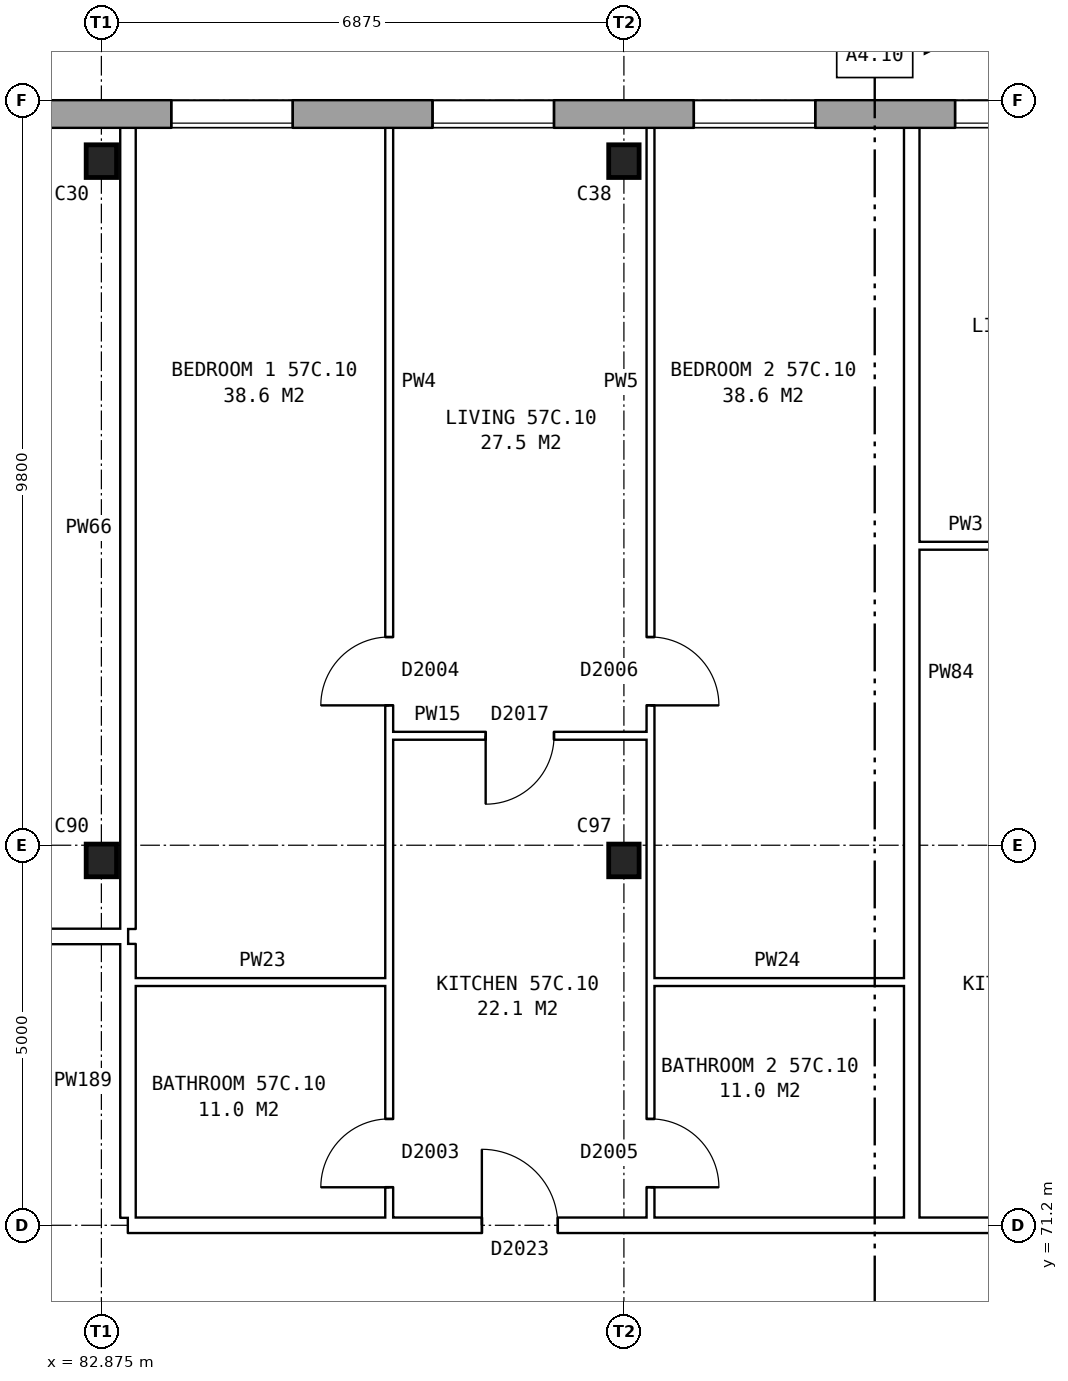
"""IFC4 building model, lengths in metres.
Left out: names, types, materials, properties, quantities, classifications, styles, units other than length and angle.
Written with IfcOpenShell. Run it as: python <this file> out.ifc"""

import sys

from ifc_helpers import new_model, si_unit, direction, frame, frame_2d, origin, origin_2d, place, context, subcontext, project, spatial, rectangle, i_section, extrude, element, fill, save


model = new_model("IFC4")
c1 = context("Model", 3, precision=1e-05, world=origin(), true_north=direction((0.0, 1.0)))
c2 = subcontext(c1, "Body", "Model", "MODEL_VIEW")
j1 = project(units=[si_unit("LENGTHUNIT", "METRE"), si_unit("PLANEANGLEUNIT", "RADIAN")], contexts=[c1])
p1 = place(None, origin())
s1 = spatial("IfcSite", under=j1, at=p1, CompositionType="ELEMENT")
p2 = place(p1, origin())
s2 = spatial("IfcBuilding", under=s1, at=p2, CompositionType="ELEMENT")
p3 = place(p2, frame((0.0, 0.0, 202.8)))
s3 = spatial("IfcBuildingStorey", under=s2, at=p3, CompositionType="ELEMENT", Elevation=202.8)
for number, where, z_axis, x_axis in (
    (1, (82.875, 76.0, 0.0), (0.0, 0.0, 1.0), (1.0, 0.0, 0.0)),
    (2, (89.75, 76.0, 0.0), (0.0, 0.0, 1.0), (1.0, 0.0, 0.0)),
    (3, (82.875, 85.2, 0.0), (0.0, 0.0, 1.0), (1.0, 0.0, 0.0)),
    (4, (89.75, 85.2, 0.0), (0.0, 0.0, 1.0), (1.0, 0.0, 0.0)),
):
    element("IfcColumn", number, at=place(p3, frame(where, z_axis=z_axis, x_axis=x_axis)), inside=s3, PredefinedType="COLUMN", context=c2, shape_type="SweptSolid", body=[
        extrude(i_section(OverallWidth=0.4, OverallDepth=0.43, WebThickness=0.04, FlangeThickness=0.04, at=origin_2d()), origin(), (0.0, 0.0, 1.0), 2.85),
    ])
p4 = place(p3, frame((131.05, 85.82, 0.0), z_axis=(0.0, 0.0, 1.0), x_axis=(-1.0, 0.0, 0.0)))
e5 = element("IfcWall", 5, at=p4, inside=s3, PredefinedType="STANDARD", context=c2, shape_type="SweptSolid", body=[
    extrude(rectangle(XDim=55.1, YDim=0.36, at=frame_2d((27.55, 0.0))), origin(), (0.0, 0.0, 1.0), 2.85),
])
p5 = place(p4, frame((0.969, 0.0, 0.8)))
e6 = element("IfcOpeningElement", 6, at=p5, cuts=e5, PredefinedType="OPENING", context=c2, shape_type="SweptSolid", body=[
    extrude(rectangle(XDim=1.6, YDim=1.8, at=frame_2d((0.8, 0.9))), frame((0.0, 0.19, 0.0), z_axis=(0.0, -1.0, 0.0), x_axis=(1.0, 0.0, 0.0)), (0.0, 0.0, 1.0), 0.38),
])
p6 = place(p4, frame((4.406, 0.0, 0.8)))
e7 = element("IfcOpeningElement", 7, at=p6, cuts=e5, PredefinedType="OPENING", context=c2, shape_type="SweptSolid", body=[
    extrude(rectangle(XDim=1.6, YDim=1.8, at=frame_2d((0.8, 0.9))), frame((0.0, 0.19, 0.0), z_axis=(0.0, -1.0, 0.0), x_axis=(1.0, 0.0, 0.0)), (0.0, 0.0, 1.0), 0.38),
])
p7 = place(p4, frame((7.844, 0.0, 0.8)))
e8 = element("IfcOpeningElement", 8, at=p7, cuts=e5, PredefinedType="OPENING", context=c2, shape_type="SweptSolid", body=[
    extrude(rectangle(XDim=1.6, YDim=1.8, at=frame_2d((0.8, 0.9))), frame((0.0, 0.19, 0.0), z_axis=(0.0, -1.0, 0.0), x_axis=(1.0, 0.0, 0.0)), (0.0, 0.0, 1.0), 0.38),
])
p8 = place(p4, frame((11.281, 0.0, 0.8)))
e9 = element("IfcOpeningElement", 9, at=p8, cuts=e5, PredefinedType="OPENING", context=c2, shape_type="SweptSolid", body=[
    extrude(rectangle(XDim=1.6, YDim=1.8, at=frame_2d((0.8, 0.9))), frame((0.0, 0.19, 0.0), z_axis=(0.0, -1.0, 0.0), x_axis=(1.0, 0.0, 0.0)), (0.0, 0.0, 1.0), 0.38),
])
p9 = place(p4, frame((14.719, 0.0, 0.8)))
e10 = element("IfcOpeningElement", 10, at=p9, cuts=e5, PredefinedType="OPENING", context=c2, shape_type="SweptSolid", body=[
    extrude(rectangle(XDim=1.6, YDim=1.8, at=frame_2d((0.8, 0.9))), frame((0.0, 0.19, 0.0), z_axis=(0.0, -1.0, 0.0), x_axis=(1.0, 0.0, 0.0)), (0.0, 0.0, 1.0), 0.38),
])
p10 = place(p4, frame((18.156, 0.0, 0.8)))
e11 = element("IfcOpeningElement", 11, at=p10, cuts=e5, PredefinedType="OPENING", context=c2, shape_type="SweptSolid", body=[
    extrude(rectangle(XDim=1.6, YDim=1.8, at=frame_2d((0.8, 0.9))), frame((0.0, 0.19, 0.0), z_axis=(0.0, -1.0, 0.0), x_axis=(1.0, 0.0, 0.0)), (0.0, 0.0, 1.0), 0.38),
])
p11 = place(p4, frame((21.594, 0.0, 0.8)))
e12 = element("IfcOpeningElement", 12, at=p11, cuts=e5, PredefinedType="OPENING", context=c2, shape_type="SweptSolid", body=[
    extrude(rectangle(XDim=1.6, YDim=1.8, at=frame_2d((0.8, 0.9))), frame((0.0, 0.19, 0.0), z_axis=(0.0, -1.0, 0.0), x_axis=(1.0, 0.0, 0.0)), (0.0, 0.0, 1.0), 0.38),
])
p12 = place(p4, frame((25.031, 0.0, 0.8)))
e13 = element("IfcOpeningElement", 13, at=p12, cuts=e5, PredefinedType="OPENING", context=c2, shape_type="SweptSolid", body=[
    extrude(rectangle(XDim=1.6, YDim=1.8, at=frame_2d((0.8, 0.9))), frame((0.0, 0.19, 0.0), z_axis=(0.0, -1.0, 0.0), x_axis=(1.0, 0.0, 0.0)), (0.0, 0.0, 1.0), 0.38),
])
p13 = place(p4, frame((28.469, 0.0, 0.8)))
e14 = element("IfcOpeningElement", 14, at=p13, cuts=e5, PredefinedType="OPENING", context=c2, shape_type="SweptSolid", body=[
    extrude(rectangle(XDim=1.6, YDim=1.8, at=frame_2d((0.8, 0.9))), frame((0.0, 0.19, 0.0), z_axis=(0.0, -1.0, 0.0), x_axis=(1.0, 0.0, 0.0)), (0.0, 0.0, 1.0), 0.38),
])
p14 = place(p4, frame((31.906, 0.0, 0.8)))
e15 = element("IfcOpeningElement", 15, at=p14, cuts=e5, PredefinedType="OPENING", context=c2, shape_type="SweptSolid", body=[
    extrude(rectangle(XDim=1.6, YDim=1.8, at=frame_2d((0.8, 0.9))), frame((0.0, 0.19, 0.0), z_axis=(0.0, -1.0, 0.0), x_axis=(1.0, 0.0, 0.0)), (0.0, 0.0, 1.0), 0.38),
])
p15 = place(p4, frame((35.344, 0.0, 0.8)))
e16 = element("IfcOpeningElement", 16, at=p15, cuts=e5, PredefinedType="OPENING", context=c2, shape_type="SweptSolid", body=[
    extrude(rectangle(XDim=1.6, YDim=1.8, at=frame_2d((0.8, 0.9))), frame((0.0, 0.19, 0.0), z_axis=(0.0, -1.0, 0.0), x_axis=(1.0, 0.0, 0.0)), (0.0, 0.0, 1.0), 0.38),
])
p16 = place(p4, frame((38.781, 0.0, 0.8)))
e17 = element("IfcOpeningElement", 17, at=p16, cuts=e5, PredefinedType="OPENING", context=c2, shape_type="SweptSolid", body=[
    extrude(rectangle(XDim=1.6, YDim=1.8, at=frame_2d((0.8, 0.9))), frame((0.0, 0.19, 0.0), z_axis=(0.0, -1.0, 0.0), x_axis=(1.0, 0.0, 0.0)), (0.0, 0.0, 1.0), 0.38),
])
p17 = place(p4, frame((42.219, 0.0, 0.8)))
e18 = element("IfcOpeningElement", 18, at=p17, cuts=e5, PredefinedType="OPENING", context=c2, shape_type="SweptSolid", body=[
    extrude(rectangle(XDim=1.6, YDim=1.8, at=frame_2d((0.8, 0.9))), frame((0.0, 0.19, 0.0), z_axis=(0.0, -1.0, 0.0), x_axis=(1.0, 0.0, 0.0)), (0.0, 0.0, 1.0), 0.38),
])
p18 = place(p4, frame((45.656, 0.0, 0.8)))
e19 = element("IfcOpeningElement", 19, at=p18, cuts=e5, PredefinedType="OPENING", context=c2, shape_type="SweptSolid", body=[
    extrude(rectangle(XDim=1.6, YDim=1.8, at=frame_2d((0.8, 0.9))), frame((0.0, 0.19, 0.0), z_axis=(0.0, -1.0, 0.0), x_axis=(1.0, 0.0, 0.0)), (0.0, 0.0, 1.0), 0.38),
])
p19 = place(p4, frame((49.094, 0.0, 0.8)))
e20 = element("IfcOpeningElement", 20, at=p19, cuts=e5, PredefinedType="OPENING", context=c2, shape_type="SweptSolid", body=[
    extrude(rectangle(XDim=1.6, YDim=1.8, at=frame_2d((0.8, 0.9))), frame((0.0, 0.19, 0.0), z_axis=(0.0, -1.0, 0.0), x_axis=(1.0, 0.0, 0.0)), (0.0, 0.0, 1.0), 0.38),
])
p20 = place(p4, frame((52.531, 0.0, 0.8)))
e21 = element("IfcOpeningElement", 21, at=p20, cuts=e5, PredefinedType="OPENING", context=c2, shape_type="SweptSolid", body=[
    extrude(rectangle(XDim=1.6, YDim=1.8, at=frame_2d((0.8, 0.9))), frame((0.0, 0.19, 0.0), z_axis=(0.0, -1.0, 0.0), x_axis=(1.0, 0.0, 0.0)), (0.0, 0.0, 1.0), 0.38),
])
p21 = place(p3, frame((83.225, 71.2, 0.0), z_axis=(0.0, 0.0, 1.0), x_axis=(1.0, 0.0, 0.0)))
e22 = element("IfcWall", 22, at=p21, inside=s3, PredefinedType="PARTITIONING", context=c2, shape_type="SweptSolid", body=[
    extrude(rectangle(XDim=41.25, YDim=0.2, at=frame_2d((20.625, 0.0))), origin(), (0.0, 0.0, 1.0), 2.85),
])
p22 = place(p21, frame((4.656, 0.0, 0.0)))
e23 = element("IfcOpeningElement", 23, at=p22, cuts=e22, PredefinedType="OPENING", context=c2, shape_type="SweptSolid", body=[
    extrude(rectangle(XDim=1.0, YDim=2.1, at=frame_2d((0.5, 1.05))), frame((0.0, 0.11, 0.0), z_axis=(0.0, -1.0, 0.0), x_axis=(1.0, 0.0, 0.0)), (0.0, 0.0, 1.0), 0.22),
])
p23 = place(p21, frame((11.531, 0.0, 0.0)))
e24 = element("IfcOpeningElement", 24, at=p23, cuts=e22, PredefinedType="OPENING", context=c2, shape_type="SweptSolid", body=[
    extrude(rectangle(XDim=1.0, YDim=2.1, at=frame_2d((0.5, 1.05))), frame((0.0, 0.11, 0.0), z_axis=(0.0, -1.0, 0.0), x_axis=(1.0, 0.0, 0.0)), (0.0, 0.0, 1.0), 0.22),
])
p24 = place(p21, frame((21.844, 0.0, 0.0)))
e25 = element("IfcOpeningElement", 25, at=p24, cuts=e22, PredefinedType="OPENING", context=c2, shape_type="SweptSolid", body=[
    extrude(rectangle(XDim=1.0, YDim=2.1, at=frame_2d((0.5, 1.05))), frame((0.0, 0.11, 0.0), z_axis=(0.0, -1.0, 0.0), x_axis=(1.0, 0.0, 0.0)), (0.0, 0.0, 1.0), 0.22),
])
p25 = place(p21, frame((32.156, 0.0, 0.0)))
e26 = element("IfcOpeningElement", 26, at=p25, cuts=e22, PredefinedType="OPENING", context=c2, shape_type="SweptSolid", body=[
    extrude(rectangle(XDim=1.0, YDim=2.1, at=frame_2d((0.5, 1.05))), frame((0.0, 0.11, 0.0), z_axis=(0.0, -1.0, 0.0), x_axis=(1.0, 0.0, 0.0)), (0.0, 0.0, 1.0), 0.22),
])
p26 = place(p21, frame((35.594, 0.0, 0.0)))
e27 = element("IfcOpeningElement", 27, at=p26, cuts=e22, PredefinedType="OPENING", context=c2, shape_type="SweptSolid", body=[
    extrude(rectangle(XDim=1.0, YDim=2.1, at=frame_2d((0.5, 1.05))), frame((0.0, 0.11, 0.0), z_axis=(0.0, -1.0, 0.0), x_axis=(1.0, 0.0, 0.0)), (0.0, 0.0, 1.0), 0.22),
])
p27 = place(p3, frame((83.325, 74.4, 0.0), z_axis=(0.0, 0.0, 1.0), x_axis=(1.0, 0.0, 0.0)))
e28 = element("IfcWall", 28, at=p27, inside=s3, PredefinedType="PARTITIONING", context=c2, shape_type="SweptSolid", body=[
    extrude(rectangle(XDim=3.337, YDim=0.1, at=frame_2d((1.668, 0.0))), origin(), (0.0, 0.0, 1.0), 2.85),
])
p28 = place(p3, frame((90.1, 74.4, 0.0), z_axis=(0.0, 0.0, 1.0), x_axis=(1.0, 0.0, 0.0)))
e29 = element("IfcWall", 29, at=p28, inside=s3, PredefinedType="PARTITIONING", context=c2, shape_type="SweptSolid", body=[
    extrude(rectangle(XDim=3.337, YDim=0.1, at=frame_2d((1.668, 0.0))), origin(), (0.0, 0.0, 1.0), 2.85),
])
p29 = place(p3, frame((75.64, 75.0, 0.0), z_axis=(0.0, 0.0, 1.0), x_axis=(1.0, 0.0, 0.0)))
e30 = element("IfcWall", 30, at=p29, inside=s3, PredefinedType="PARTITIONING", context=c2, shape_type="SweptSolid", body=[
    extrude(rectangle(XDim=7.585, YDim=0.2, at=frame_2d((3.792, 0.0))), origin(), (0.0, 0.0, 1.0), 2.85),
])
p30 = place(p29, frame((3.343, 0.0, 0.0)))
e31 = element("IfcOpeningElement", 31, at=p30, cuts=e30, PredefinedType="OPENING", context=c2, shape_type="SweptSolid", body=[
    extrude(rectangle(XDim=0.9, YDim=2.1, at=frame_2d((0.45, 1.05))), frame((0.0, 0.11, 0.0), z_axis=(0.0, -1.0, 0.0), x_axis=(1.0, 0.0, 0.0)), (0.0, 0.0, 1.0), 0.22),
])
p31 = place(p3, frame((86.662, 77.64, 0.0), z_axis=(0.0, 0.0, 1.0), x_axis=(1.0, 0.0, 0.0)))
e32 = element("IfcWall", 32, at=p31, inside=s3, PredefinedType="PARTITIONING", context=c2, shape_type="SweptSolid", body=[
    extrude(rectangle(XDim=3.438, YDim=0.1, at=frame_2d((1.719, 0.0))), origin(), (0.0, 0.0, 1.0), 2.85),
])
p32 = place(p31, frame((1.269, 0.0, 0.0)))
e33 = element("IfcOpeningElement", 33, at=p32, cuts=e32, PredefinedType="OPENING", context=c2, shape_type="SweptSolid", body=[
    extrude(rectangle(XDim=0.9, YDim=2.1, at=frame_2d((0.45, 1.05))), frame((0.0, 0.06, 0.0), z_axis=(0.0, -1.0, 0.0), x_axis=(1.0, 0.0, 0.0)), (0.0, 0.0, 1.0), 0.12),
])
p33 = place(p3, frame((93.637, 80.14, 0.0), z_axis=(0.0, 0.0, 1.0), x_axis=(1.0, 0.0, 0.0)))
e34 = element("IfcWall", 34, at=p33, inside=s3, PredefinedType="PARTITIONING", context=c2, shape_type="SweptSolid", body=[
    extrude(rectangle(XDim=3.338, YDim=0.1, at=frame_2d((1.669, 0.0))), origin(), (0.0, 0.0, 1.0), 2.85),
])
p34 = place(p33, frame((1.219, 0.0, 0.0)))
e35 = element("IfcOpeningElement", 35, at=p34, cuts=e34, PredefinedType="OPENING", context=c2, shape_type="SweptSolid", body=[
    extrude(rectangle(XDim=0.9, YDim=2.1, at=frame_2d((0.45, 1.05))), frame((0.0, 0.06, 0.0), z_axis=(0.0, -1.0, 0.0), x_axis=(1.0, 0.0, 0.0)), (0.0, 0.0, 1.0), 0.12),
])
p35 = place(p3, frame((83.225, 71.3, 0.0), z_axis=(0.0, 0.0, 1.0), x_axis=(0.0, 1.0, 0.0)))
e36 = element("IfcWall", 36, at=p35, inside=s3, PredefinedType="PARTITIONING", context=c2, shape_type="SweptSolid", body=[
    extrude(rectangle(XDim=3.6, YDim=0.2, at=frame_2d((1.8, 0.0))), origin(), (0.0, 0.0, 1.0), 2.85),
])
p36 = place(p3, frame((83.225, 75.1, 0.0), z_axis=(0.0, 0.0, 1.0), x_axis=(0.0, 1.0, 0.0)))
e37 = element("IfcWall", 37, at=p36, inside=s3, PredefinedType="PARTITIONING", context=c2, shape_type="SweptSolid", body=[
    extrude(rectangle(XDim=10.54, YDim=0.2, at=frame_2d((5.27, 0.0))), origin(), (0.0, 0.0, 1.0), 2.85),
])
p37 = place(p3, frame((86.662, 71.3, 0.0), z_axis=(0.0, 0.0, 1.0), x_axis=(0.0, 1.0, 0.0)))
e38 = element("IfcWall", 38, at=p37, inside=s3, PredefinedType="PARTITIONING", context=c2, shape_type="SweptSolid", body=[
    extrude(rectangle(XDim=14.34, YDim=0.1, at=frame_2d((7.17, 0.0))), origin(), (0.0, 0.0, 1.0), 2.85),
])
p38 = place(p37, frame((6.74, 0.0, 0.0)))
e39 = element("IfcOpeningElement", 39, at=p38, cuts=e38, PredefinedType="OPENING", context=c2, shape_type="SweptSolid", body=[
    extrude(rectangle(XDim=0.9, YDim=2.1, at=frame_2d((0.45, 1.05))), frame((0.0, 0.06, 0.0), z_axis=(0.0, -1.0, 0.0), x_axis=(1.0, 0.0, 0.0)), (0.0, 0.0, 1.0), 0.12),
])
p39 = place(p37, frame((0.4, 0.0, 0.0)))
e40 = element("IfcOpeningElement", 40, at=p39, cuts=e38, PredefinedType="OPENING", context=c2, shape_type="SweptSolid", body=[
    extrude(rectangle(XDim=0.9, YDim=2.1, at=frame_2d((0.45, 1.05))), frame((0.0, 0.06, 0.0), z_axis=(0.0, -1.0, 0.0), x_axis=(1.0, 0.0, 0.0)), (0.0, 0.0, 1.0), 0.12),
])
p40 = place(p3, frame((90.1, 71.3, 0.0), z_axis=(0.0, 0.0, 1.0), x_axis=(0.0, 1.0, 0.0)))
e41 = element("IfcWall", 41, at=p40, inside=s3, PredefinedType="PARTITIONING", context=c2, shape_type="SweptSolid", body=[
    extrude(rectangle(XDim=14.34, YDim=0.1, at=frame_2d((7.17, 0.0))), origin(), (0.0, 0.0, 1.0), 2.85),
])
p41 = place(p40, frame((6.74, 0.0, 0.0)))
e42 = element("IfcOpeningElement", 42, at=p41, cuts=e41, PredefinedType="OPENING", context=c2, shape_type="SweptSolid", body=[
    extrude(rectangle(XDim=0.9, YDim=2.1, at=frame_2d((0.45, 1.05))), frame((0.0, 0.06, 0.0), z_axis=(0.0, -1.0, 0.0), x_axis=(1.0, 0.0, 0.0)), (0.0, 0.0, 1.0), 0.12),
])
p42 = place(p40, frame((0.4, 0.0, 0.0)))
e43 = element("IfcOpeningElement", 43, at=p42, cuts=e41, PredefinedType="OPENING", context=c2, shape_type="SweptSolid", body=[
    extrude(rectangle(XDim=0.9, YDim=2.1, at=frame_2d((0.45, 1.05))), frame((0.0, 0.06, 0.0), z_axis=(0.0, -1.0, 0.0), x_axis=(1.0, 0.0, 0.0)), (0.0, 0.0, 1.0), 0.12),
])
p43 = place(p3, frame((93.537, 71.3, 0.0), z_axis=(0.0, 0.0, 1.0), x_axis=(0.0, 1.0, 0.0)))
e44 = element("IfcWall", 44, at=p43, inside=s3, PredefinedType="PARTITIONING", context=c2, shape_type="SweptSolid", body=[
    extrude(rectangle(XDim=14.34, YDim=0.2, at=frame_2d((7.17, 0.0))), origin(), (0.0, 0.0, 1.0), 2.85),
])
p44 = place(p15, origin())
e45 = element("IfcWindow", 45, at=p44, inside=s3, PartitioningType="SINGLE_PANEL", PredefinedType="WINDOW", context=c2, shape_type="SweptSolid", body=[
    extrude(rectangle(XDim=1.6, YDim=1.8, at=frame_2d((0.8, 0.9))), frame((0.0, 0.15, 0.0), z_axis=(0.0, -1.0, 0.0), x_axis=(1.0, 0.0, 0.0)), (0.0, 0.0, 1.0), 0.06),
])
fill(e16, e45)
p45 = place(p16, origin())
e46 = element("IfcWindow", 46, at=p45, inside=s3, PartitioningType="SINGLE_PANEL", PredefinedType="WINDOW", context=c2, shape_type="SweptSolid", body=[
    extrude(rectangle(XDim=1.6, YDim=1.8, at=frame_2d((0.8, 0.9))), frame((0.0, 0.15, 0.0), z_axis=(0.0, -1.0, 0.0), x_axis=(1.0, 0.0, 0.0)), (0.0, 0.0, 1.0), 0.06),
])
fill(e17, e46)
p46 = place(p17, origin())
e47 = element("IfcWindow", 47, at=p46, inside=s3, PartitioningType="SINGLE_PANEL", PredefinedType="WINDOW", context=c2, shape_type="SweptSolid", body=[
    extrude(rectangle(XDim=1.6, YDim=1.8, at=frame_2d((0.8, 0.9))), frame((0.0, 0.15, 0.0), z_axis=(0.0, -1.0, 0.0), x_axis=(1.0, 0.0, 0.0)), (0.0, 0.0, 1.0), 0.06),
])
fill(e18, e47)
p47 = place(p18, origin())
e48 = element("IfcWindow", 48, at=p47, inside=s3, PartitioningType="SINGLE_PANEL", PredefinedType="WINDOW", context=c2, shape_type="SweptSolid", body=[
    extrude(rectangle(XDim=1.6, YDim=1.8, at=frame_2d((0.8, 0.9))), frame((0.0, 0.15, 0.0), z_axis=(0.0, -1.0, 0.0), x_axis=(1.0, 0.0, 0.0)), (0.0, 0.0, 1.0), 0.06),
])
fill(e19, e48)
p48 = place(p38, origin())
e49 = element("IfcDoor", 49, at=p48, inside=s3, OperationType="SINGLE_SWING_LEFT", PredefinedType="DOOR", context=c2, shape_type="SweptSolid", body=[
    extrude(rectangle(XDim=0.9, YDim=2.1, at=frame_2d((0.45, 1.05))), frame((0.0, 0.025, 0.0), z_axis=(0.0, -1.0, 0.0), x_axis=(1.0, 0.0, 0.0)), (0.0, 0.0, 1.0), 0.05),
])
fill(e39, e49)
p49 = place(p41, frame((0.9, 0.0, 0.0), z_axis=(0.0, 0.0, 1.0), x_axis=(-1.0, 0.0, 0.0)))
e50 = element("IfcDoor", 50, at=p49, inside=s3, OperationType="SINGLE_SWING_RIGHT", PredefinedType="DOOR", context=c2, shape_type="SweptSolid", body=[
    extrude(rectangle(XDim=0.9, YDim=2.1, at=frame_2d((0.45, 1.05))), frame((0.0, 0.025, 0.0), z_axis=(0.0, -1.0, 0.0), x_axis=(1.0, 0.0, 0.0)), (0.0, 0.0, 1.0), 0.05),
])
fill(e42, e50)
p50 = place(p22, origin())
e51 = element("IfcDoor", 51, at=p50, inside=s3, OperationType="SINGLE_SWING_LEFT", PredefinedType="DOOR", context=c2, shape_type="SweptSolid", body=[
    extrude(rectangle(XDim=1.0, YDim=2.1, at=frame_2d((0.5, 1.05))), frame((0.0, 0.025, 0.0), z_axis=(0.0, -1.0, 0.0), x_axis=(1.0, 0.0, 0.0)), (0.0, 0.0, 1.0), 0.05),
])
fill(e23, e51)
p51 = place(p32, frame((0.9, 0.0, 0.0), z_axis=(0.0, 0.0, 1.0), x_axis=(-1.0, 0.0, 0.0)))
e52 = element("IfcDoor", 52, at=p51, inside=s3, OperationType="SINGLE_SWING_RIGHT", PredefinedType="DOOR", context=c2, shape_type="SweptSolid", body=[
    extrude(rectangle(XDim=0.9, YDim=2.1, at=frame_2d((0.45, 1.05))), frame((0.0, 0.025, 0.0), z_axis=(0.0, -1.0, 0.0), x_axis=(1.0, 0.0, 0.0)), (0.0, 0.0, 1.0), 0.05),
])
fill(e33, e52)
p52 = place(p39, origin())
e53 = element("IfcDoor", 53, at=p52, inside=s3, OperationType="SINGLE_SWING_LEFT", PredefinedType="DOOR", context=c2, shape_type="SweptSolid", body=[
    extrude(rectangle(XDim=0.9, YDim=2.1, at=frame_2d((0.45, 1.05))), frame((0.0, 0.025, 0.0), z_axis=(0.0, -1.0, 0.0), x_axis=(1.0, 0.0, 0.0)), (0.0, 0.0, 1.0), 0.05),
])
fill(e40, e53)
p53 = place(p42, frame((0.9, 0.0, 0.0), z_axis=(0.0, 0.0, 1.0), x_axis=(-1.0, 0.0, 0.0)))
e54 = element("IfcDoor", 54, at=p53, inside=s3, OperationType="SINGLE_SWING_RIGHT", PredefinedType="DOOR", context=c2, shape_type="SweptSolid", body=[
    extrude(rectangle(XDim=0.9, YDim=2.1, at=frame_2d((0.45, 1.05))), frame((0.0, 0.025, 0.0), z_axis=(0.0, -1.0, 0.0), x_axis=(1.0, 0.0, 0.0)), (0.0, 0.0, 1.0), 0.05),
])
fill(e43, e54)
save(model, sys.argv[1])
